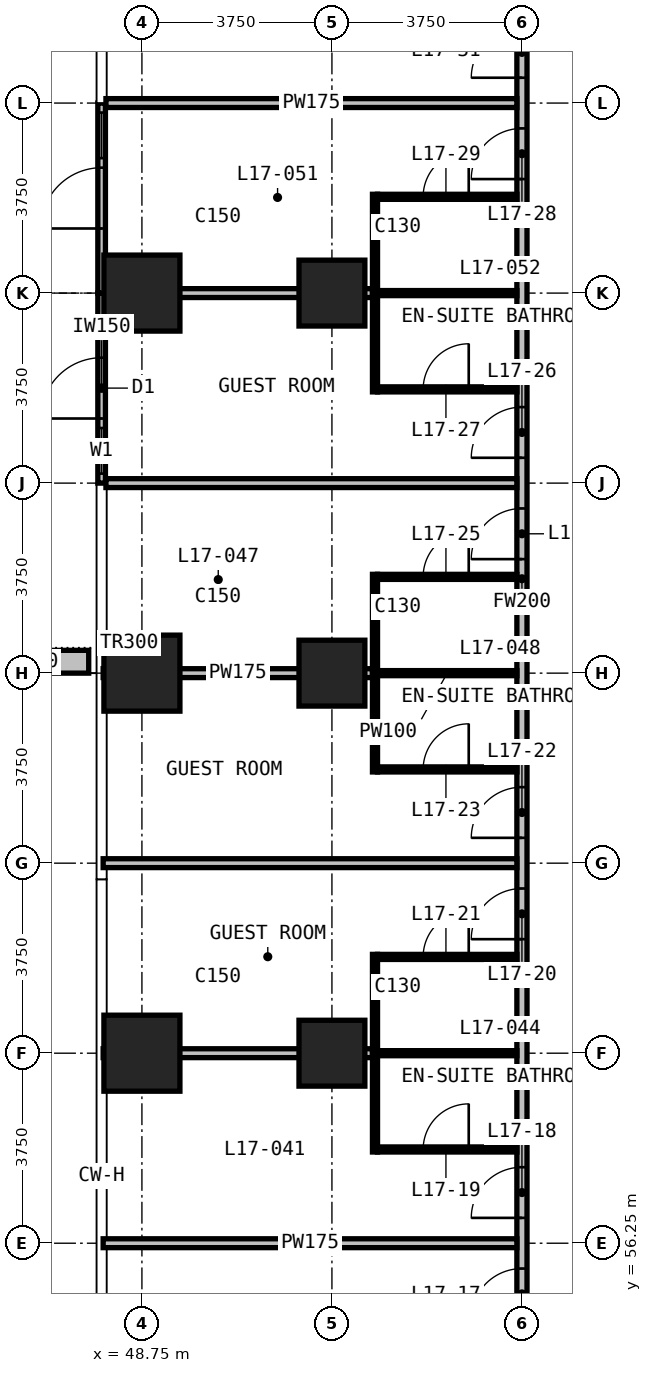
"""IFC4 building model, lengths in metres.
Left out: names, types, materials, properties, quantities, classifications, styles, units other than length and angle.
Written with IfcOpenShell. Run it as: python <this file> out.ifc"""

import sys

from ifc_helpers import new_model, si_unit, direction, frame, frame_2d, origin, origin_2d, place, context, subcontext, project, spatial, rectangle, extrude, element, fill, save


model = new_model("IFC4")
c1 = context("Model", 3, precision=1e-05, world=origin(), true_north=direction((0.0, 1.0)))
c2 = subcontext(c1, "Body", "Model", "MODEL_VIEW")
j1 = project(units=[si_unit("LENGTHUNIT", "METRE"), si_unit("PLANEANGLEUNIT", "RADIAN")], contexts=[c1])
p1 = place(None, origin())
s1 = spatial("IfcSite", under=j1, at=p1, CompositionType="ELEMENT")
p2 = place(p1, origin())
s2 = spatial("IfcBuilding", under=s1, at=p2, CompositionType="ELEMENT")
p3 = place(p2, frame((0.0, 0.0, 75.8)))
s3 = spatial("IfcBuildingStorey", under=s2, at=p3, CompositionType="ELEMENT", Elevation=75.8)
for number, where, z_axis, x_axis in (
    (1, (48.75, 60.0, 0.0), (0.0, 0.0, 1.0), (1.0, 0.0, 0.0)),
    (2, (48.75, 67.5, 0.0), (0.0, 0.0, 1.0), (1.0, 0.0, 0.0)),
    (3, (48.75, 75.0, 0.0), (0.0, 0.0, 1.0), (1.0, 0.0, 0.0)),
):
    element("IfcColumn", number, at=place(p3, frame(where, z_axis=z_axis, x_axis=x_axis)), inside=s3, PredefinedType="COLUMN", context=c2, shape_type="SweptSolid", body=[
        extrude(rectangle(XDim=1.5, YDim=1.5, at=origin_2d()), origin(), (0.0, 0.0, 1.0), 3.3),
    ])
for number, where, z_axis, x_axis in (
    (4, (52.5, 60.0, 0.0), (0.0, 0.0, 1.0), (1.0, 0.0, 0.0)),
    (5, (52.5, 67.5, 0.0), (0.0, 0.0, 1.0), (1.0, 0.0, 0.0)),
    (6, (52.5, 75.0, 0.0), (0.0, 0.0, 1.0), (1.0, 0.0, 0.0)),
):
    element("IfcColumn", number, at=place(p3, frame(where, z_axis=z_axis, x_axis=x_axis)), inside=s3, PredefinedType="COLUMN", context=c2, shape_type="SweptSolid", body=[
        extrude(rectangle(XDim=1.3, YDim=1.3, at=origin_2d()), origin(), (0.0, 0.0, 1.0), 3.3),
    ])
p4 = place(p3, frame((47.955, 71.25, 0.0), z_axis=(0.0, 0.0, 1.0), x_axis=(0.0, 1.0, 0.0)))
e7 = element("IfcWall", 7, at=p4, inside=s3, PredefinedType="SOLIDWALL", context=c2, shape_type="SweptSolid", body=[
    extrude(rectangle(XDim=3.75, YDim=0.15, at=frame_2d((1.875, 0.0))), origin(), (0.0, 0.0, 1.0), 3.0),
])
p5 = place(p4, frame((0.188, 0.0, 0.1)))
e8 = element("IfcOpeningElement", 8, at=p5, cuts=e7, PredefinedType="OPENING", context=c2, shape_type="SweptSolid", body=[
    extrude(rectangle(XDim=0.9, YDim=2.4, at=frame_2d((0.45, 1.2))), frame((0.0, 0.085, 0.0), z_axis=(0.0, -1.0, 0.0), x_axis=(1.0, 0.0, 0.0)), (0.0, 0.0, 1.0), 0.17),
])
p6 = place(p4, frame((1.275, 0.0, 0.0)))
e9 = element("IfcOpeningElement", 9, at=p6, cuts=e7, PredefinedType="OPENING", context=c2, shape_type="SweptSolid", body=[
    extrude(rectangle(XDim=1.2, YDim=2.4, at=frame_2d((0.6, 1.2))), frame((0.0, 0.085, 0.0), z_axis=(0.0, -1.0, 0.0), x_axis=(1.0, 0.0, 0.0)), (0.0, 0.0, 1.0), 0.17),
])
p7 = place(p3, frame((47.955, 75.0, 0.0), z_axis=(0.0, 0.0, 1.0), x_axis=(0.0, 1.0, 0.0)))
e10 = element("IfcWall", 10, at=p7, inside=s3, PredefinedType="SOLIDWALL", context=c2, shape_type="SweptSolid", body=[
    extrude(rectangle(XDim=3.75, YDim=0.15, at=frame_2d((1.875, 0.0))), origin(), (0.0, 0.0, 1.0), 3.0),
])
p8 = place(p7, frame((1.275, 0.0, 0.0)))
e11 = element("IfcOpeningElement", 11, at=p8, cuts=e10, PredefinedType="OPENING", context=c2, shape_type="SweptSolid", body=[
    extrude(rectangle(XDim=1.2, YDim=2.4, at=frame_2d((0.6, 1.2))), frame((0.0, 0.085, 0.0), z_axis=(0.0, -1.0, 0.0), x_axis=(1.0, 0.0, 0.0)), (0.0, 0.0, 1.0), 0.17),
])
p9 = place(p7, frame((2.663, 0.0, 0.1)))
e12 = element("IfcOpeningElement", 12, at=p9, cuts=e10, PredefinedType="OPENING", context=c2, shape_type="SweptSolid", body=[
    extrude(rectangle(XDim=0.9, YDim=2.4, at=frame_2d((0.45, 1.2))), frame((0.0, 0.085, 0.0), z_axis=(0.0, -1.0, 0.0), x_axis=(1.0, 0.0, 0.0)), (0.0, 0.0, 1.0), 0.17),
])
p10 = place(p3, frame((47.7, 67.725, 0.0), z_axis=(0.0, 0.0, 1.0), x_axis=(-1.0, 0.0, 0.0)))
e13 = element("IfcWall", 13, at=p10, inside=s3, PredefinedType="USERDEFINED", context=c2, shape_type="SweptSolid", body=[
    extrude(rectangle(XDim=2.35, YDim=0.45, at=frame_2d((1.175, 0.0))), origin(), (0.0, 0.0, 1.0), 1.1),
])
p11 = place(p3, frame((56.25, 52.4, 0.0), z_axis=(0.0, 0.0, 1.0), x_axis=(0.0, 1.0, 0.0)))
e14 = element("IfcWall", 14, at=p11, inside=s3, PredefinedType="PARTITIONING", context=c2, shape_type="SweptSolid", body=[
    extrude(rectangle(XDim=33.925, YDim=0.2, at=frame_2d((16.962, 0.0))), origin(), (0.0, 0.0, 1.0), 3.0),
])
p12 = place(p11, frame((2.35, 0.0, 0.0)))
e15 = element("IfcOpeningElement", 15, at=p12, cuts=e14, PredefinedType="OPENING", context=c2, shape_type="SweptSolid", body=[
    extrude(rectangle(XDim=1.0, YDim=2.2, at=frame_2d((0.5, 1.1))), frame((0.0, 0.11, 0.0), z_axis=(0.0, -1.0, 0.0), x_axis=(1.0, 0.0, 0.0)), (0.0, 0.0, 1.0), 0.22),
])
p13 = place(p11, frame((4.35, 0.0, 0.0)))
e16 = element("IfcOpeningElement", 16, at=p13, cuts=e14, PredefinedType="OPENING", context=c2, shape_type="SweptSolid", body=[
    extrude(rectangle(XDim=1.0, YDim=2.2, at=frame_2d((0.5, 1.1))), frame((0.0, 0.11, 0.0), z_axis=(0.0, -1.0, 0.0), x_axis=(1.0, 0.0, 0.0)), (0.0, 0.0, 1.0), 0.22),
])
p14 = place(p11, frame((9.85, 0.0, 0.0)))
e17 = element("IfcOpeningElement", 17, at=p14, cuts=e14, PredefinedType="OPENING", context=c2, shape_type="SweptSolid", body=[
    extrude(rectangle(XDim=1.0, YDim=2.2, at=frame_2d((0.5, 1.1))), frame((0.0, 0.11, 0.0), z_axis=(0.0, -1.0, 0.0), x_axis=(1.0, 0.0, 0.0)), (0.0, 0.0, 1.0), 0.22),
])
p15 = place(p11, frame((11.85, 0.0, 0.0)))
e18 = element("IfcOpeningElement", 18, at=p15, cuts=e14, PredefinedType="OPENING", context=c2, shape_type="SweptSolid", body=[
    extrude(rectangle(XDim=1.0, YDim=2.2, at=frame_2d((0.5, 1.1))), frame((0.0, 0.11, 0.0), z_axis=(0.0, -1.0, 0.0), x_axis=(1.0, 0.0, 0.0)), (0.0, 0.0, 1.0), 0.22),
])
p16 = place(p11, frame((17.35, 0.0, 0.0)))
e19 = element("IfcOpeningElement", 19, at=p16, cuts=e14, PredefinedType="OPENING", context=c2, shape_type="SweptSolid", body=[
    extrude(rectangle(XDim=1.0, YDim=2.2, at=frame_2d((0.5, 1.1))), frame((0.0, 0.11, 0.0), z_axis=(0.0, -1.0, 0.0), x_axis=(1.0, 0.0, 0.0)), (0.0, 0.0, 1.0), 0.22),
])
p17 = place(p11, frame((19.35, 0.0, 0.0)))
e20 = element("IfcOpeningElement", 20, at=p17, cuts=e14, PredefinedType="OPENING", context=c2, shape_type="SweptSolid", body=[
    extrude(rectangle(XDim=1.0, YDim=2.2, at=frame_2d((0.5, 1.1))), frame((0.0, 0.11, 0.0), z_axis=(0.0, -1.0, 0.0), x_axis=(1.0, 0.0, 0.0)), (0.0, 0.0, 1.0), 0.22),
])
p18 = place(p11, frame((24.85, 0.0, 0.0)))
e21 = element("IfcOpeningElement", 21, at=p18, cuts=e14, PredefinedType="OPENING", context=c2, shape_type="SweptSolid", body=[
    extrude(rectangle(XDim=1.0, YDim=2.2, at=frame_2d((0.5, 1.1))), frame((0.0, 0.11, 0.0), z_axis=(0.0, -1.0, 0.0), x_axis=(1.0, 0.0, 0.0)), (0.0, 0.0, 1.0), 0.22),
])
p19 = place(p11, frame((26.85, 0.0, 0.0)))
e22 = element("IfcOpeningElement", 22, at=p19, cuts=e14, PredefinedType="OPENING", context=c2, shape_type="SweptSolid", body=[
    extrude(rectangle(XDim=1.0, YDim=2.2, at=frame_2d((0.5, 1.1))), frame((0.0, 0.11, 0.0), z_axis=(0.0, -1.0, 0.0), x_axis=(1.0, 0.0, 0.0)), (0.0, 0.0, 1.0), 0.22),
])
p20 = place(p11, frame((31.55, 0.0, 0.0)))
e23 = element("IfcOpeningElement", 23, at=p20, cuts=e14, PredefinedType="OPENING", context=c2, shape_type="SweptSolid", body=[
    extrude(rectangle(XDim=0.9, YDim=2.2, at=frame_2d((0.45, 1.1))), frame((0.0, 0.11, 0.0), z_axis=(0.0, -1.0, 0.0), x_axis=(1.0, 0.0, 0.0)), (0.0, 0.0, 1.0), 0.22),
])
p21 = place(p3, frame((47.985, 56.25, 0.0), z_axis=(0.0, 0.0, 1.0), x_axis=(1.0, 0.0, 0.0)))
e24 = element("IfcWall", 24, at=p21, inside=s3, PredefinedType="PARTITIONING", context=c2, shape_type="SweptSolid", body=[
    extrude(rectangle(XDim=8.165, YDim=0.175, at=frame_2d((4.083, 0.0))), origin(), (0.0, 0.0, 1.0), 3.0),
])
p22 = place(p3, frame((47.985, 60.0, 0.0), z_axis=(0.0, 0.0, 1.0), x_axis=(1.0, 0.0, 0.0)))
e25 = element("IfcWall", 25, at=p22, inside=s3, PredefinedType="PARTITIONING", context=c2, shape_type="SweptSolid", body=[
    extrude(rectangle(XDim=5.315, YDim=0.175, at=frame_2d((2.657, 0.0))), origin(), (0.0, 0.0, 1.0), 3.0),
])
p23 = place(p3, frame((47.985, 63.75, 0.0), z_axis=(0.0, 0.0, 1.0), x_axis=(1.0, 0.0, 0.0)))
e26 = element("IfcWall", 26, at=p23, inside=s3, PredefinedType="PARTITIONING", context=c2, shape_type="SweptSolid", body=[
    extrude(rectangle(XDim=8.165, YDim=0.175, at=frame_2d((4.083, 0.0))), origin(), (0.0, 0.0, 1.0), 3.0),
])
p24 = place(p3, frame((47.985, 67.5, 0.0), z_axis=(0.0, 0.0, 1.0), x_axis=(1.0, 0.0, 0.0)))
e27 = element("IfcWall", 27, at=p24, inside=s3, PredefinedType="PARTITIONING", context=c2, shape_type="SweptSolid", body=[
    extrude(rectangle(XDim=5.315, YDim=0.175, at=frame_2d((2.657, 0.0))), origin(), (0.0, 0.0, 1.0), 3.0),
])
p25 = place(p3, frame((48.04, 71.25, 0.0), z_axis=(0.0, 0.0, 1.0), x_axis=(1.0, 0.0, 0.0)))
e28 = element("IfcWall", 28, at=p25, inside=s3, PredefinedType="PARTITIONING", context=c2, shape_type="SweptSolid", body=[
    extrude(rectangle(XDim=8.11, YDim=0.175, at=frame_2d((4.055, 0.0))), origin(), (0.0, 0.0, 1.0), 3.0),
])
p26 = place(p3, frame((48.04, 75.0, 0.0), z_axis=(0.0, 0.0, 1.0), x_axis=(1.0, 0.0, 0.0)))
e29 = element("IfcWall", 29, at=p26, inside=s3, PredefinedType="PARTITIONING", context=c2, shape_type="SweptSolid", body=[
    extrude(rectangle(XDim=5.26, YDim=0.175, at=frame_2d((2.63, 0.0))), origin(), (0.0, 0.0, 1.0), 3.0),
])
p27 = place(p3, frame((48.04, 78.75, 0.0), z_axis=(0.0, 0.0, 1.0), x_axis=(1.0, 0.0, 0.0)))
e30 = element("IfcWall", 30, at=p27, inside=s3, PredefinedType="PARTITIONING", context=c2, shape_type="SweptSolid", body=[
    extrude(rectangle(XDim=8.11, YDim=0.175, at=frame_2d((4.055, 0.0))), origin(), (0.0, 0.0, 1.0), 3.0),
])
p28 = place(p3, frame((53.4, 58.1, 0.0), z_axis=(0.0, 0.0, 1.0), x_axis=(1.0, 0.0, 0.0)))
e31 = element("IfcWall", 31, at=p28, inside=s3, PredefinedType="PARTITIONING", context=c2, shape_type="SweptSolid", body=[
    extrude(rectangle(XDim=2.75, YDim=0.1, at=frame_2d((1.375, 0.0))), origin(), (0.0, 0.0, 1.0), 3.0),
])
p29 = place(p28, frame((0.9, 0.0, 0.0)))
e32 = element("IfcOpeningElement", 32, at=p29, cuts=e31, PredefinedType="OPENING", context=c2, shape_type="SweptSolid", body=[
    extrude(rectangle(XDim=0.9, YDim=2.2, at=frame_2d((0.45, 1.1))), frame((0.0, 0.06, 0.0), z_axis=(0.0, -1.0, 0.0), x_axis=(1.0, 0.0, 0.0)), (0.0, 0.0, 1.0), 0.12),
])
p30 = place(p3, frame((53.4, 60.0, 0.0), z_axis=(0.0, 0.0, 1.0), x_axis=(1.0, 0.0, 0.0)))
e33 = element("IfcWall", 33, at=p30, inside=s3, PredefinedType="PARTITIONING", context=c2, shape_type="SweptSolid", body=[
    extrude(rectangle(XDim=2.75, YDim=0.1, at=frame_2d((1.375, 0.0))), origin(), (0.0, 0.0, 1.0), 3.0),
])
p31 = place(p3, frame((53.4, 61.9, 0.0), z_axis=(0.0, 0.0, 1.0), x_axis=(1.0, 0.0, 0.0)))
e34 = element("IfcWall", 34, at=p31, inside=s3, PredefinedType="PARTITIONING", context=c2, shape_type="SweptSolid", body=[
    extrude(rectangle(XDim=2.75, YDim=0.1, at=frame_2d((1.375, 0.0))), origin(), (0.0, 0.0, 1.0), 3.0),
])
p32 = place(p31, frame((0.9, 0.0, 0.0)))
e35 = element("IfcOpeningElement", 35, at=p32, cuts=e34, PredefinedType="OPENING", context=c2, shape_type="SweptSolid", body=[
    extrude(rectangle(XDim=0.9, YDim=2.2, at=frame_2d((0.45, 1.1))), frame((0.0, 0.06, 0.0), z_axis=(0.0, -1.0, 0.0), x_axis=(1.0, 0.0, 0.0)), (0.0, 0.0, 1.0), 0.12),
])
p33 = place(p3, frame((53.4, 65.6, 0.0), z_axis=(0.0, 0.0, 1.0), x_axis=(1.0, 0.0, 0.0)))
e36 = element("IfcWall", 36, at=p33, inside=s3, PredefinedType="PARTITIONING", context=c2, shape_type="SweptSolid", body=[
    extrude(rectangle(XDim=2.75, YDim=0.1, at=frame_2d((1.375, 0.0))), origin(), (0.0, 0.0, 1.0), 3.0),
])
p34 = place(p33, frame((0.9, 0.0, 0.0)))
e37 = element("IfcOpeningElement", 37, at=p34, cuts=e36, PredefinedType="OPENING", context=c2, shape_type="SweptSolid", body=[
    extrude(rectangle(XDim=0.9, YDim=2.2, at=frame_2d((0.45, 1.1))), frame((0.0, 0.06, 0.0), z_axis=(0.0, -1.0, 0.0), x_axis=(1.0, 0.0, 0.0)), (0.0, 0.0, 1.0), 0.12),
])
p35 = place(p3, frame((53.4, 67.5, 0.0), z_axis=(0.0, 0.0, 1.0), x_axis=(1.0, 0.0, 0.0)))
e38 = element("IfcWall", 38, at=p35, inside=s3, PredefinedType="PARTITIONING", context=c2, shape_type="SweptSolid", body=[
    extrude(rectangle(XDim=2.75, YDim=0.1, at=frame_2d((1.375, 0.0))), origin(), (0.0, 0.0, 1.0), 3.0),
])
p36 = place(p3, frame((53.4, 69.4, 0.0), z_axis=(0.0, 0.0, 1.0), x_axis=(1.0, 0.0, 0.0)))
e39 = element("IfcWall", 39, at=p36, inside=s3, PredefinedType="PARTITIONING", context=c2, shape_type="SweptSolid", body=[
    extrude(rectangle(XDim=2.75, YDim=0.1, at=frame_2d((1.375, 0.0))), origin(), (0.0, 0.0, 1.0), 3.0),
])
p37 = place(p36, frame((0.9, 0.0, 0.0)))
e40 = element("IfcOpeningElement", 40, at=p37, cuts=e39, PredefinedType="OPENING", context=c2, shape_type="SweptSolid", body=[
    extrude(rectangle(XDim=0.9, YDim=2.2, at=frame_2d((0.45, 1.1))), frame((0.0, 0.06, 0.0), z_axis=(0.0, -1.0, 0.0), x_axis=(1.0, 0.0, 0.0)), (0.0, 0.0, 1.0), 0.12),
])
p38 = place(p3, frame((53.4, 73.1, 0.0), z_axis=(0.0, 0.0, 1.0), x_axis=(1.0, 0.0, 0.0)))
e41 = element("IfcWall", 41, at=p38, inside=s3, PredefinedType="PARTITIONING", context=c2, shape_type="SweptSolid", body=[
    extrude(rectangle(XDim=2.75, YDim=0.1, at=frame_2d((1.375, 0.0))), origin(), (0.0, 0.0, 1.0), 3.0),
])
p39 = place(p38, frame((0.9, 0.0, 0.0)))
e42 = element("IfcOpeningElement", 42, at=p39, cuts=e41, PredefinedType="OPENING", context=c2, shape_type="SweptSolid", body=[
    extrude(rectangle(XDim=0.9, YDim=2.2, at=frame_2d((0.45, 1.1))), frame((0.0, 0.06, 0.0), z_axis=(0.0, -1.0, 0.0), x_axis=(1.0, 0.0, 0.0)), (0.0, 0.0, 1.0), 0.12),
])
p40 = place(p3, frame((53.4, 75.0, 0.0), z_axis=(0.0, 0.0, 1.0), x_axis=(1.0, 0.0, 0.0)))
e43 = element("IfcWall", 43, at=p40, inside=s3, PredefinedType="PARTITIONING", context=c2, shape_type="SweptSolid", body=[
    extrude(rectangle(XDim=2.75, YDim=0.1, at=frame_2d((1.375, 0.0))), origin(), (0.0, 0.0, 1.0), 3.0),
])
p41 = place(p3, frame((53.4, 76.9, 0.0), z_axis=(0.0, 0.0, 1.0), x_axis=(1.0, 0.0, 0.0)))
e44 = element("IfcWall", 44, at=p41, inside=s3, PredefinedType="PARTITIONING", context=c2, shape_type="SweptSolid", body=[
    extrude(rectangle(XDim=2.75, YDim=0.1, at=frame_2d((1.375, 0.0))), origin(), (0.0, 0.0, 1.0), 3.0),
])
p42 = place(p41, frame((0.9, 0.0, 0.0)))
e45 = element("IfcOpeningElement", 45, at=p42, cuts=e44, PredefinedType="OPENING", context=c2, shape_type="SweptSolid", body=[
    extrude(rectangle(XDim=0.9, YDim=2.2, at=frame_2d((0.45, 1.1))), frame((0.0, 0.06, 0.0), z_axis=(0.0, -1.0, 0.0), x_axis=(1.0, 0.0, 0.0)), (0.0, 0.0, 1.0), 0.12),
])
for number, where, z_axis, x_axis in (
    (46, (53.35, 58.05, 0.0), (0.0, 0.0, 1.0), (0.0, 1.0, 0.0)),
    (47, (53.35, 65.55, 0.0), (0.0, 0.0, 1.0), (0.0, 1.0, 0.0)),
    (48, (53.35, 73.05, 0.0), (0.0, 0.0, 1.0), (0.0, 1.0, 0.0)),
):
    element("IfcWall", number, at=place(p3, frame(where, z_axis=z_axis, x_axis=x_axis)), inside=s3, PredefinedType="PARTITIONING", context=c2, shape_type="SweptSolid", body=[
        extrude(rectangle(XDim=3.9, YDim=0.1, at=frame_2d((1.95, 0.0))), origin(), (0.0, 0.0, 1.0), 3.0),
    ])
p43 = place(p5, origin())
e49 = element("IfcWindow", 49, at=p43, inside=s3, PartitioningType="SINGLE_PANEL", PredefinedType="WINDOW", context=c2, shape_type="SweptSolid", body=[
    extrude(rectangle(XDim=0.9, YDim=2.4, at=frame_2d((0.45, 1.2))), frame((0.0, 0.03, 0.0), z_axis=(0.0, -1.0, 0.0), x_axis=(1.0, 0.0, 0.0)), (0.0, 0.0, 1.0), 0.06),
])
fill(e8, e49)
p44 = place(p6, origin())
e50 = element("IfcDoor", 50, at=p44, inside=s3, OperationType="SINGLE_SWING_LEFT", PredefinedType="DOOR", context=c2, shape_type="SweptSolid", body=[
    extrude(rectangle(XDim=1.2, YDim=2.4, at=frame_2d((0.6, 1.2))), frame((0.0, 0.025, 0.0), z_axis=(0.0, -1.0, 0.0), x_axis=(1.0, 0.0, 0.0)), (0.0, 0.0, 1.0), 0.05),
])
fill(e9, e50)
p45 = place(p8, origin())
e51 = element("IfcDoor", 51, at=p45, inside=s3, OperationType="SINGLE_SWING_LEFT", PredefinedType="DOOR", context=c2, shape_type="SweptSolid", body=[
    extrude(rectangle(XDim=1.2, YDim=2.4, at=frame_2d((0.6, 1.2))), frame((0.0, 0.025, 0.0), z_axis=(0.0, -1.0, 0.0), x_axis=(1.0, 0.0, 0.0)), (0.0, 0.0, 1.0), 0.05),
])
fill(e11, e51)
p46 = place(p9, origin())
e52 = element("IfcWindow", 52, at=p46, inside=s3, PartitioningType="SINGLE_PANEL", PredefinedType="WINDOW", context=c2, shape_type="SweptSolid", body=[
    extrude(rectangle(XDim=0.9, YDim=2.4, at=frame_2d((0.45, 1.2))), frame((0.0, 0.03, 0.0), z_axis=(0.0, -1.0, 0.0), x_axis=(1.0, 0.0, 0.0)), (0.0, 0.0, 1.0), 0.06),
])
fill(e12, e52)
p47 = place(p12, origin())
e53 = element("IfcDoor", 53, at=p47, inside=s3, OperationType="SINGLE_SWING_RIGHT", PredefinedType="DOOR", context=c2, shape_type="SweptSolid", body=[
    extrude(rectangle(XDim=1.0, YDim=2.2, at=frame_2d((0.5, 1.1))), frame((0.0, 0.025, 0.0), z_axis=(0.0, -1.0, 0.0), x_axis=(1.0, 0.0, 0.0)), (0.0, 0.0, 1.0), 0.05),
])
fill(e15, e53)
p48 = place(p13, origin())
e54 = element("IfcDoor", 54, at=p48, inside=s3, OperationType="SINGLE_SWING_RIGHT", PredefinedType="DOOR", context=c2, shape_type="SweptSolid", body=[
    extrude(rectangle(XDim=1.0, YDim=2.2, at=frame_2d((0.5, 1.1))), frame((0.0, 0.025, 0.0), z_axis=(0.0, -1.0, 0.0), x_axis=(1.0, 0.0, 0.0)), (0.0, 0.0, 1.0), 0.05),
])
fill(e16, e54)
p49 = place(p29, origin())
e55 = element("IfcDoor", 55, at=p49, inside=s3, OperationType="SINGLE_SWING_RIGHT", PredefinedType="DOOR", context=c2, shape_type="SweptSolid", body=[
    extrude(rectangle(XDim=0.9, YDim=2.2, at=frame_2d((0.45, 1.1))), frame((0.0, 0.025, 0.0), z_axis=(0.0, -1.0, 0.0), x_axis=(1.0, 0.0, 0.0)), (0.0, 0.0, 1.0), 0.05),
])
fill(e32, e55)
p50 = place(p14, origin())
e56 = element("IfcDoor", 56, at=p50, inside=s3, OperationType="SINGLE_SWING_RIGHT", PredefinedType="DOOR", context=c2, shape_type="SweptSolid", body=[
    extrude(rectangle(XDim=1.0, YDim=2.2, at=frame_2d((0.5, 1.1))), frame((0.0, 0.025, 0.0), z_axis=(0.0, -1.0, 0.0), x_axis=(1.0, 0.0, 0.0)), (0.0, 0.0, 1.0), 0.05),
])
fill(e17, e56)
p51 = place(p32, origin())
e57 = element("IfcDoor", 57, at=p51, inside=s3, OperationType="SINGLE_SWING_RIGHT", PredefinedType="DOOR", context=c2, shape_type="SweptSolid", body=[
    extrude(rectangle(XDim=0.9, YDim=2.2, at=frame_2d((0.45, 1.1))), frame((0.0, 0.025, 0.0), z_axis=(0.0, -1.0, 0.0), x_axis=(1.0, 0.0, 0.0)), (0.0, 0.0, 1.0), 0.05),
])
fill(e35, e57)
p52 = place(p15, origin())
e58 = element("IfcDoor", 58, at=p52, inside=s3, OperationType="SINGLE_SWING_RIGHT", PredefinedType="DOOR", context=c2, shape_type="SweptSolid", body=[
    extrude(rectangle(XDim=1.0, YDim=2.2, at=frame_2d((0.5, 1.1))), frame((0.0, 0.025, 0.0), z_axis=(0.0, -1.0, 0.0), x_axis=(1.0, 0.0, 0.0)), (0.0, 0.0, 1.0), 0.05),
])
fill(e18, e58)
p53 = place(p34, origin())
e59 = element("IfcDoor", 59, at=p53, inside=s3, OperationType="SINGLE_SWING_RIGHT", PredefinedType="DOOR", context=c2, shape_type="SweptSolid", body=[
    extrude(rectangle(XDim=0.9, YDim=2.2, at=frame_2d((0.45, 1.1))), frame((0.0, 0.025, 0.0), z_axis=(0.0, -1.0, 0.0), x_axis=(1.0, 0.0, 0.0)), (0.0, 0.0, 1.0), 0.05),
])
fill(e37, e59)
p54 = place(p16, origin())
e60 = element("IfcDoor", 60, at=p54, inside=s3, OperationType="SINGLE_SWING_LEFT", PredefinedType="DOOR", context=c2, shape_type="SweptSolid", body=[
    extrude(rectangle(XDim=1.0, YDim=2.2, at=frame_2d((0.5, 1.1))), frame((0.0, 0.025, 0.0), z_axis=(0.0, -1.0, 0.0), x_axis=(1.0, 0.0, 0.0)), (0.0, 0.0, 1.0), 0.05),
])
fill(e19, e60)
p55 = place(p37, origin())
e61 = element("IfcDoor", 61, at=p55, inside=s3, OperationType="SINGLE_SWING_RIGHT", PredefinedType="DOOR", context=c2, shape_type="SweptSolid", body=[
    extrude(rectangle(XDim=0.9, YDim=2.2, at=frame_2d((0.45, 1.1))), frame((0.0, 0.025, 0.0), z_axis=(0.0, -1.0, 0.0), x_axis=(1.0, 0.0, 0.0)), (0.0, 0.0, 1.0), 0.05),
])
fill(e40, e61)
p56 = place(p17, origin())
e62 = element("IfcDoor", 62, at=p56, inside=s3, OperationType="SINGLE_SWING_LEFT", PredefinedType="DOOR", context=c2, shape_type="SweptSolid", body=[
    extrude(rectangle(XDim=1.0, YDim=2.2, at=frame_2d((0.5, 1.1))), frame((0.0, 0.025, 0.0), z_axis=(0.0, -1.0, 0.0), x_axis=(1.0, 0.0, 0.0)), (0.0, 0.0, 1.0), 0.05),
])
fill(e20, e62)
p57 = place(p39, origin())
e63 = element("IfcDoor", 63, at=p57, inside=s3, OperationType="SINGLE_SWING_RIGHT", PredefinedType="DOOR", context=c2, shape_type="SweptSolid", body=[
    extrude(rectangle(XDim=0.9, YDim=2.2, at=frame_2d((0.45, 1.1))), frame((0.0, 0.025, 0.0), z_axis=(0.0, -1.0, 0.0), x_axis=(1.0, 0.0, 0.0)), (0.0, 0.0, 1.0), 0.05),
])
fill(e42, e63)
p58 = place(p18, origin())
e64 = element("IfcDoor", 64, at=p58, inside=s3, OperationType="SINGLE_SWING_LEFT", PredefinedType="DOOR", context=c2, shape_type="SweptSolid", body=[
    extrude(rectangle(XDim=1.0, YDim=2.2, at=frame_2d((0.5, 1.1))), frame((0.0, 0.025, 0.0), z_axis=(0.0, -1.0, 0.0), x_axis=(1.0, 0.0, 0.0)), (0.0, 0.0, 1.0), 0.05),
])
fill(e21, e64)
p59 = place(p42, origin())
e65 = element("IfcDoor", 65, at=p59, inside=s3, OperationType="SINGLE_SWING_RIGHT", PredefinedType="DOOR", context=c2, shape_type="SweptSolid", body=[
    extrude(rectangle(XDim=0.9, YDim=2.2, at=frame_2d((0.45, 1.1))), frame((0.0, 0.025, 0.0), z_axis=(0.0, -1.0, 0.0), x_axis=(1.0, 0.0, 0.0)), (0.0, 0.0, 1.0), 0.05),
])
fill(e45, e65)
p60 = place(p19, origin())
e66 = element("IfcDoor", 66, at=p60, inside=s3, OperationType="SINGLE_SWING_LEFT", PredefinedType="DOOR", context=c2, shape_type="SweptSolid", body=[
    extrude(rectangle(XDim=1.0, YDim=2.2, at=frame_2d((0.5, 1.1))), frame((0.0, 0.025, 0.0), z_axis=(0.0, -1.0, 0.0), x_axis=(1.0, 0.0, 0.0)), (0.0, 0.0, 1.0), 0.05),
])
fill(e22, e66)
save(model, sys.argv[1])
